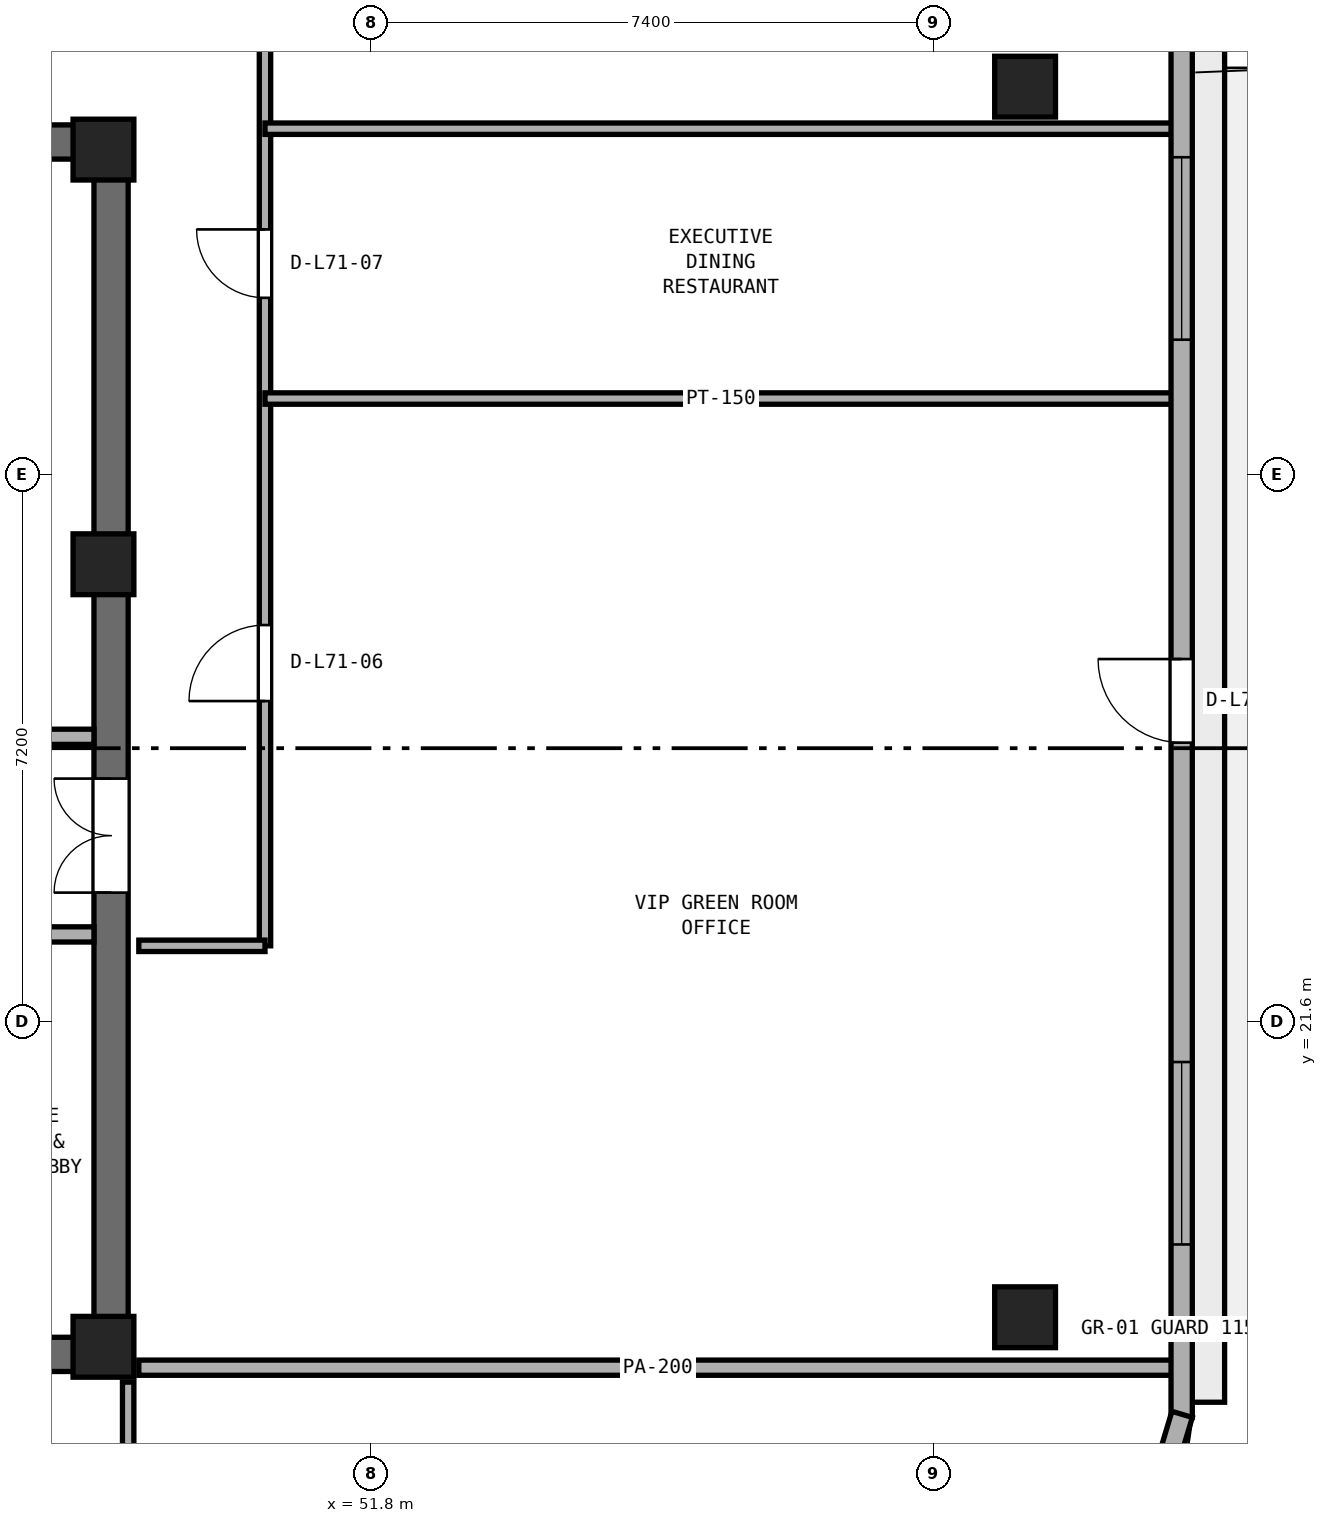
"""IFC4 building model, lengths in metres.
Left out: names, types, materials, properties, quantities, classifications, styles, units other than length and angle.
Written with IfcOpenShell. Run it as: python <this file> out.ifc"""

import sys

from ifc_helpers import new_model, si_unit, direction, frame, frame_2d, origin, origin_2d, place, context, subcontext, project, spatial, rectangle, extrude, element, fill, save


model = new_model("IFC4")
c1 = context("Model", 3, precision=1e-05, world=origin(), true_north=direction((0.0, 1.0)))
c2 = subcontext(c1, "Body", "Model", "MODEL_VIEW")
j1 = project(units=[si_unit("LENGTHUNIT", "METRE"), si_unit("PLANEANGLEUNIT", "RADIAN")], contexts=[c1])
p1 = place(None, origin())
s1 = spatial("IfcSite", under=j1, at=p1, CompositionType="ELEMENT")
p2 = place(p1, origin())
s2 = spatial("IfcBuilding", under=s1, at=p2, CompositionType="ELEMENT")
p3 = place(p2, frame((0.0, 0.0, 278.2)))
s3 = spatial("IfcBuildingStorey", under=s2, at=p3, CompositionType="ELEMENT", Elevation=278.2)
for number, where, z_axis, x_axis in (
    (1, (25.4, 17.225, 0.0), (0.0, 0.0, 1.0), (1.0, 0.0, 0.0)),
    (2, (25.4, 33.175, 0.0), (0.0, 0.0, 1.0), (1.0, 0.0, 0.0)),
):
    element("IfcWall", number, at=place(p3, frame(where, z_axis=z_axis, x_axis=x_axis)), inside=s3, PredefinedType="SHEAR", context=c2, shape_type="SweptSolid", body=[
        extrude(rectangle(XDim=23.2, YDim=0.45, at=frame_2d((11.6, 0.0))), origin(), (0.0, 0.0, 1.0), 3.54),
    ])
p4 = place(p3, frame((48.375, 17.45, 0.0), z_axis=(0.0, 0.0, 1.0), x_axis=(0.0, 1.0, 0.0)))
e3 = element("IfcWall", 3, at=p4, inside=s3, PredefinedType="SHEAR", context=c2, shape_type="SweptSolid", body=[
    extrude(rectangle(XDim=15.5, YDim=0.45, at=frame_2d((7.75, 0.0))), origin(), (0.0, 0.0, 1.0), 3.54),
])
p5 = place(p4, frame((5.85, 0.0, 0.0)))
e4 = element("IfcOpeningElement", 4, at=p5, cuts=e3, PredefinedType="OPENING", context=c2, shape_type="SweptSolid", body=[
    extrude(rectangle(XDim=1.5, YDim=2.15, at=frame_2d((0.75, 1.075))), frame((0.0, 0.235, 0.0), z_axis=(0.0, -1.0, 0.0), x_axis=(1.0, 0.0, 0.0)), (0.0, 0.0, 1.0), 0.47),
])
for number, where, z_axis, x_axis in (
    (5, (48.275, 17.325, 0.0), (0.0, 0.0, 1.0), (1.0, 0.0, 0.0)),
    (6, (48.275, 27.62, 0.0), (0.0, 0.0, 1.0), (1.0, 0.0, 0.0)),
    (7, (48.275, 33.075, 0.0), (0.0, 0.0, 1.0), (1.0, 0.0, 0.0)),
):
    element("IfcColumn", number, at=place(p3, frame(where, z_axis=z_axis, x_axis=x_axis)), inside=s3, PredefinedType="PILASTER", context=c2, shape_type="SweptSolid", body=[
        extrude(rectangle(XDim=0.8, YDim=0.8, at=origin_2d()), origin(), (0.0, 0.0, 1.0), 3.8),
    ])
for number, where, z_axis, x_axis in (
    (8, (60.4, 17.714, 0.0), (0.0, 0.0, 1.0), (1.0, 0.0, 0.0)),
    (9, (60.4, 33.903, 0.0), (0.0, 0.0, 1.0), (1.0, 0.0, 0.0)),
):
    element("IfcColumn", number, at=place(p3, frame(where, z_axis=z_axis, x_axis=x_axis)), inside=s3, PredefinedType="COLUMN", context=c2, shape_type="SweptSolid", body=[
        extrude(rectangle(XDim=0.8, YDim=0.8, at=origin_2d()), origin(), (0.0, 0.0, 1.0), 3.8),
    ])
p6 = place(p3, frame((42.0, 22.75, 0.0), z_axis=(0.0, 0.0, 1.0), x_axis=(1.0, 0.0, 0.0)))
e10 = element("IfcWall", 10, at=p6, inside=s3, PredefinedType="SOLIDWALL", context=c2, shape_type="SweptSolid", body=[
    extrude(rectangle(XDim=6.15, YDim=0.2, at=frame_2d((3.075, 0.0))), origin(), (0.0, 0.0, 1.0), 3.54),
])
p7 = place(p3, frame((46.1, 25.35, 0.0), z_axis=(0.0, 0.0, 1.0), x_axis=(1.0, 0.0, 0.0)))
e11 = element("IfcWall", 11, at=p7, inside=s3, PredefinedType="SOLIDWALL", context=c2, shape_type="SweptSolid", body=[
    extrude(rectangle(XDim=2.05, YDim=0.2, at=frame_2d((1.025, 0.0))), origin(), (0.0, 0.0, 1.0), 3.54),
])
p8 = place(p3, frame((50.4, 22.6, 0.0), z_axis=(0.0, 0.0, 1.0), x_axis=(0.0, 1.0, 0.0)))
e12 = element("IfcWall", 12, at=p8, inside=s3, PredefinedType="PARTITIONING", context=c2, shape_type="SweptSolid", body=[
    extrude(rectangle(XDim=12.6, YDim=0.15, at=frame_2d((6.3, 0.0))), origin(), (0.0, 0.0, 1.0), 3.54),
])
p9 = place(p8, frame((3.22, 0.0, 0.0)))
e13 = element("IfcOpeningElement", 13, at=p9, cuts=e12, PredefinedType="OPENING", context=c2, shape_type="SweptSolid", body=[
    extrude(rectangle(XDim=1.0, YDim=2.12, at=frame_2d((0.5, 1.06))), frame((0.0, 0.085, 0.0), z_axis=(0.0, -1.0, 0.0), x_axis=(1.0, 0.0, 0.0)), (0.0, 0.0, 1.0), 0.17),
])
p10 = place(p8, frame((8.525, 0.0, 0.0)))
e14 = element("IfcOpeningElement", 14, at=p10, cuts=e12, PredefinedType="OPENING", context=c2, shape_type="SweptSolid", body=[
    extrude(rectangle(XDim=0.9, YDim=2.1, at=frame_2d((0.45, 1.05))), frame((0.0, 0.085, 0.0), z_axis=(0.0, -1.0, 0.0), x_axis=(1.0, 0.0, 0.0)), (0.0, 0.0, 1.0), 0.17),
])
p11 = place(p3, frame((48.6, 15.2, 0.0), z_axis=(0.0, 0.0, 1.0), x_axis=(0.0, 1.0, 0.0)))
e15 = element("IfcWall", 15, at=p11, inside=s3, PredefinedType="PARTITIONING", context=c2, shape_type="SweptSolid", body=[
    extrude(rectangle(XDim=1.66, YDim=0.15, at=frame_2d((0.83, 0.0))), origin(), (0.0, 0.0, 1.0), 3.54),
])
p12 = place(p3, frame((48.74, 17.05, 0.0), z_axis=(0.0, 0.0, 1.0), x_axis=(1.0, 0.0, 0.0)))
e16 = element("IfcWall", 16, at=p12, inside=s3, PredefinedType="PARTITIONING", context=c2, shape_type="SweptSolid", body=[
    extrude(rectangle(XDim=13.655, YDim=0.2, at=frame_2d((6.828, 0.0))), origin(), (0.0, 0.0, 1.0), 2.923),
])
p13 = place(p3, frame((48.74, 22.6, 0.0), z_axis=(0.0, 0.0, 1.0), x_axis=(1.0, 0.0, 0.0)))
e17 = element("IfcWall", 17, at=p13, inside=s3, PredefinedType="PARTITIONING", context=c2, shape_type="SweptSolid", body=[
    extrude(rectangle(XDim=1.66, YDim=0.15, at=frame_2d((0.83, 0.0))), origin(), (0.0, 0.0, 1.0), 3.54),
])
p14 = place(p3, frame((50.4, 29.8, 0.0), z_axis=(0.0, 0.0, 1.0), x_axis=(1.0, 0.0, 0.0)))
e18 = element("IfcWall", 18, at=p14, inside=s3, PredefinedType="PARTITIONING", context=c2, shape_type="SweptSolid", body=[
    extrude(rectangle(XDim=11.995, YDim=0.15, at=frame_2d((5.998, 0.0))), origin(), (0.0, 0.0, 1.0), 3.54),
])
p15 = place(p3, frame((50.4, 33.35, 0.0), z_axis=(0.0, 0.0, 1.0), x_axis=(1.0, 0.0, 0.0)))
e19 = element("IfcWall", 19, at=p15, inside=s3, PredefinedType="PARTITIONING", context=c2, shape_type="SweptSolid", body=[
    extrude(rectangle(XDim=11.995, YDim=0.15, at=frame_2d((5.998, 0.0))), origin(), (0.0, 0.0, 1.0), 2.923),
])
p16 = place(p3, frame((62.46, 16.396, 0.0), z_axis=(0.0, 0.0, 1.0), x_axis=(0.0, 1.0, 0.0)))
e20 = element("IfcWall", 20, at=p16, inside=s3, PredefinedType="STANDARD", context=c2, shape_type="SweptSolid", body=[
    extrude(rectangle(XDim=18.854, YDim=0.28, at=frame_2d((9.427, 0.0))), origin(), (0.0, 0.0, 1.0), 3.54),
])
p17 = place(p16, frame((8.877, 0.0, 0.0)))
e21 = element("IfcOpeningElement", 21, at=p17, cuts=e20, PredefinedType="OPENING", context=c2, shape_type="SweptSolid", body=[
    extrude(rectangle(XDim=1.1, YDim=2.2, at=frame_2d((0.55, 1.1))), frame((0.0, 0.15, 0.0), z_axis=(0.0, -1.0, 0.0), x_axis=(1.0, 0.0, 0.0)), (0.0, 0.0, 1.0), 0.3),
])
p18 = place(p16, frame((2.276, 0.0, 0.9)))
e22 = element("IfcOpeningElement", 22, at=p18, cuts=e20, PredefinedType="OPENING", context=c2, shape_type="SweptSolid", body=[
    extrude(rectangle(XDim=2.4, YDim=1.75, at=frame_2d((1.2, 0.875))), frame((0.0, 0.15, 0.0), z_axis=(0.0, -1.0, 0.0), x_axis=(1.0, 0.0, 0.0)), (0.0, 0.0, 1.0), 0.3),
])
p19 = place(p16, frame((14.179, 0.0, 0.9)))
e23 = element("IfcOpeningElement", 23, at=p19, cuts=e20, PredefinedType="OPENING", context=c2, shape_type="SweptSolid", body=[
    extrude(rectangle(XDim=2.4, YDim=1.75, at=frame_2d((1.2, 0.875))), frame((0.0, 0.15, 0.0), z_axis=(0.0, -1.0, 0.0), x_axis=(1.0, 0.0, 0.0)), (0.0, 0.0, 1.0), 0.3),
])
p20 = place(p3, frame((61.839, 14.344, 0.0), z_axis=(0.0, 0.0, 1.0), x_axis=(0.287235049694, 0.957860128739, 0.0)))
e24 = element("IfcWall", 24, at=p20, inside=s3, PredefinedType="STANDARD", context=c2, shape_type="SweptSolid", body=[
    extrude(rectangle(XDim=2.184, YDim=0.28, at=frame_2d((1.092, 0.0))), origin(), (0.0, 0.0, 1.0), 3.54),
])
p21 = place(p5, origin())
e25 = element("IfcDoor", 25, at=p21, inside=s3, OperationType="DOUBLE_DOOR_SINGLE_SWING", PredefinedType="DOOR", context=c2, shape_type="SweptSolid", body=[
    extrude(rectangle(XDim=1.5, YDim=2.15, at=frame_2d((0.75, 1.075))), frame((0.0, 0.025, 0.0), z_axis=(0.0, -1.0, 0.0), x_axis=(1.0, 0.0, 0.0)), (0.0, 0.0, 1.0), 0.05),
])
fill(e4, e25)
p22 = place(p9, origin())
e26 = element("IfcDoor", 26, at=p22, inside=s3, OperationType="SINGLE_SWING_LEFT", PredefinedType="DOOR", context=c2, shape_type="SweptSolid", body=[
    extrude(rectangle(XDim=1.0, YDim=2.12, at=frame_2d((0.5, 1.06))), frame((0.0, 0.025, 0.0), z_axis=(0.0, -1.0, 0.0), x_axis=(1.0, 0.0, 0.0)), (0.0, 0.0, 1.0), 0.05),
])
fill(e13, e26)
p23 = place(p10, origin())
e27 = element("IfcDoor", 27, at=p23, inside=s3, OperationType="SINGLE_SWING_RIGHT", PredefinedType="DOOR", context=c2, shape_type="SweptSolid", body=[
    extrude(rectangle(XDim=0.9, YDim=2.1, at=frame_2d((0.45, 1.05))), frame((0.0, 0.025, 0.0), z_axis=(0.0, -1.0, 0.0), x_axis=(1.0, 0.0, 0.0)), (0.0, 0.0, 1.0), 0.05),
])
fill(e14, e27)
p24 = place(p17, origin())
e28 = element("IfcDoor", 28, at=p24, inside=s3, OperationType="SINGLE_SWING_RIGHT", PredefinedType="DOOR", context=c2, shape_type="SweptSolid", body=[
    extrude(rectangle(XDim=1.1, YDim=2.2, at=frame_2d((0.55, 1.1))), frame((0.0, 0.025, 0.0), z_axis=(0.0, -1.0, 0.0), x_axis=(1.0, 0.0, 0.0)), (0.0, 0.0, 1.0), 0.05),
])
fill(e21, e28)
p25 = place(p18, origin())
e29 = element("IfcWindow", 29, at=p25, inside=s3, PartitioningType="SINGLE_PANEL", PredefinedType="WINDOW", context=c2, shape_type="SweptSolid", body=[
    extrude(rectangle(XDim=2.4, YDim=1.75, at=frame_2d((1.2, 0.875))), frame((0.0, 0.03, 0.0), z_axis=(0.0, -1.0, 0.0), x_axis=(1.0, 0.0, 0.0)), (0.0, 0.0, 1.0), 0.06),
])
fill(e22, e29)
p26 = place(p19, origin())
e30 = element("IfcWindow", 30, at=p26, inside=s3, PartitioningType="SINGLE_PANEL", PredefinedType="WINDOW", context=c2, shape_type="SweptSolid", body=[
    extrude(rectangle(XDim=2.4, YDim=1.75, at=frame_2d((1.2, 0.875))), frame((0.0, 0.03, 0.0), z_axis=(0.0, -1.0, 0.0), x_axis=(1.0, 0.0, 0.0)), (0.0, 0.0, 1.0), 0.06),
])
fill(e23, e30)
save(model, sys.argv[1])
